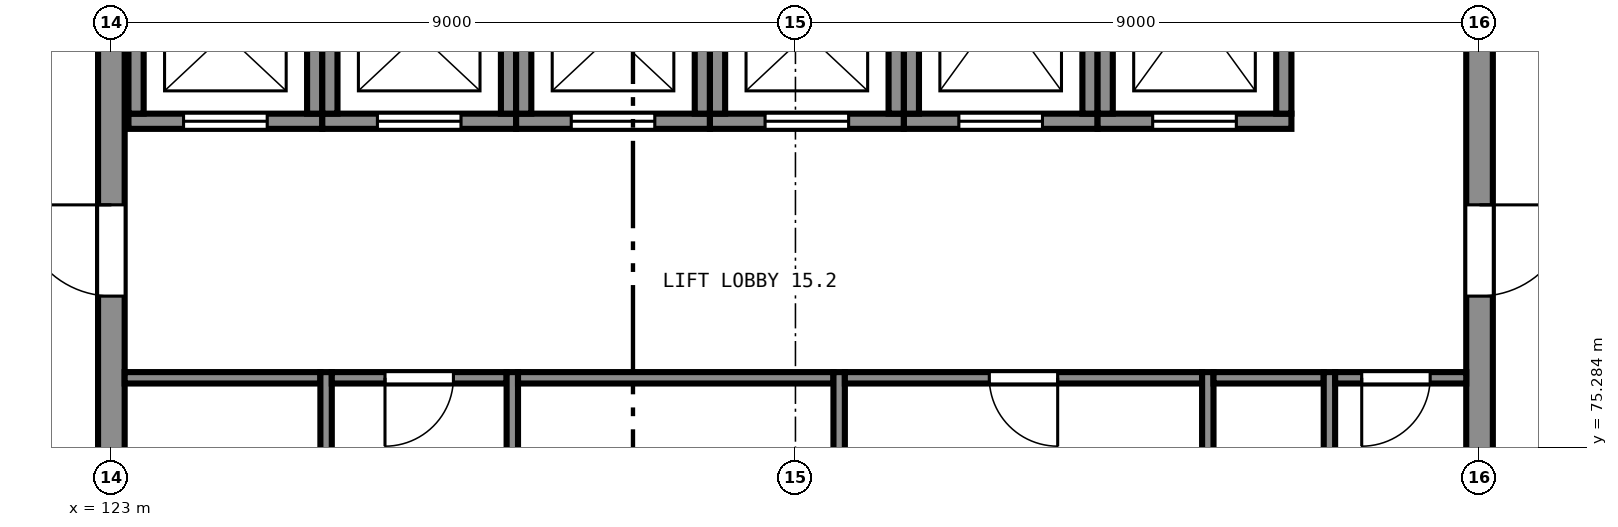
"""IFC4 building model, lengths in metres.
Left out: names, types, materials, properties, quantities, classifications, styles, units other than length and angle.
Written with IfcOpenShell. Run it as: python <this file> out.ifc"""

import sys

from ifc_helpers import new_model, si_unit, direction, frame, frame_2d, origin, place, context, subcontext, project, spatial, rectangle, extrude, element, fill, save


model = new_model("IFC4")
c1 = context("Model", 3, precision=1e-05, world=origin(), true_north=direction((0.0, 1.0)))
c2 = subcontext(c1, "Body", "Model", "MODEL_VIEW")
j1 = project(units=[si_unit("LENGTHUNIT", "METRE"), si_unit("PLANEANGLEUNIT", "RADIAN")], contexts=[c1])
p1 = place(None, origin())
s1 = spatial("IfcSite", under=j1, at=p1, CompositionType="ELEMENT")
p2 = place(p1, origin())
s2 = spatial("IfcBuilding", under=s1, at=p2, CompositionType="ELEMENT")
p3 = place(p2, frame((0.0, 0.0, 61.5)))
s3 = spatial("IfcBuildingStorey", under=s2, at=p3, CompositionType="ELEMENT", Elevation=61.5)
p4 = place(p3, frame((141.0, 65.175, 0.0), z_axis=(0.0, 0.0, 1.0), x_axis=(0.0, 1.0, 0.0)))
e1 = element("IfcWall", 1, at=p4, inside=s3, PredefinedType="SHEAR", context=c2, shape_type="SweptSolid", body=[
    extrude(rectangle(XDim=17.65, YDim=0.35, at=frame_2d((8.825, 0.0))), origin(), (0.0, 0.0, 1.0), 4.0),
])
p5 = place(p4, frame((4.35, 0.0, 0.0)))
e2 = element("IfcOpeningElement", 2, at=p5, cuts=e1, PredefinedType="OPENING", context=c2, shape_type="SweptSolid", body=[
    extrude(rectangle(XDim=1.2, YDim=2.1, at=frame_2d((0.6, 1.05))), frame((0.0, 0.185, 0.0), z_axis=(0.0, -1.0, 0.0), x_axis=(1.0, 0.0, 0.0)), (0.0, 0.0, 1.0), 0.37),
])
p6 = place(p4, frame((12.1, 0.0, 0.0)))
e3 = element("IfcOpeningElement", 3, at=p6, cuts=e1, PredefinedType="OPENING", context=c2, shape_type="SweptSolid", body=[
    extrude(rectangle(XDim=1.2, YDim=2.1, at=frame_2d((0.6, 1.05))), frame((0.0, 0.185, 0.0), z_axis=(0.0, -1.0, 0.0), x_axis=(1.0, 0.0, 0.0)), (0.0, 0.0, 1.0), 0.37),
])
p7 = place(p3, frame((123.0, 82.825, 0.0), z_axis=(0.0, 0.0, 1.0), x_axis=(0.0, -1.0, 0.0)))
e4 = element("IfcWall", 4, at=p7, inside=s3, PredefinedType="SHEAR", context=c2, shape_type="SweptSolid", body=[
    extrude(rectangle(XDim=17.65, YDim=0.35, at=frame_2d((8.825, 0.0))), origin(), (0.0, 0.0, 1.0), 4.0),
])
p8 = place(p7, frame((12.1, 0.0, 0.0)))
e5 = element("IfcOpeningElement", 5, at=p8, cuts=e4, PredefinedType="OPENING", context=c2, shape_type="SweptSolid", body=[
    extrude(rectangle(XDim=1.2, YDim=2.1, at=frame_2d((0.6, 1.05))), frame((0.0, 0.185, 0.0), z_axis=(0.0, -1.0, 0.0), x_axis=(1.0, 0.0, 0.0)), (0.0, 0.0, 1.0), 0.37),
])
p9 = place(p7, frame((4.35, 0.0, 0.0)))
e6 = element("IfcOpeningElement", 6, at=p9, cuts=e4, PredefinedType="OPENING", context=c2, shape_type="SweptSolid", body=[
    extrude(rectangle(XDim=1.2, YDim=2.1, at=frame_2d((0.6, 1.05))), frame((0.0, 0.185, 0.0), z_axis=(0.0, -1.0, 0.0), x_axis=(1.0, 0.0, 0.0)), (0.0, 0.0, 1.0), 0.37),
])
p10 = place(p3, frame((123.225, 79.575, 0.0), z_axis=(0.0, 0.0, 1.0), x_axis=(1.0, 0.0, 0.0)))
e7 = element("IfcWall", 7, at=p10, inside=s3, PredefinedType="SHEAR", context=c2, shape_type="SweptSolid", body=[
    extrude(rectangle(XDim=2.55, YDim=0.2, at=frame_2d((1.275, 0.0))), origin(), (0.0, 0.0, 1.0), 4.0),
])
p11 = place(p10, frame((0.725, 0.0, 0.0)))
e8 = element("IfcOpeningElement", 8, at=p11, cuts=e7, PredefinedType="OPENING", context=c2, shape_type="SweptSolid", body=[
    extrude(rectangle(XDim=1.1, YDim=2.1, at=frame_2d((0.55, 1.05))), frame((0.0, 0.11, 0.0), z_axis=(0.0, -1.0, 0.0), x_axis=(1.0, 0.0, 0.0)), (0.0, 0.0, 1.0), 0.22),
])
for number, where, z_axis, x_axis in (
    (9, (125.675, 79.675, 0.0), (0.0, 0.0, 1.0), (0.0, 1.0, 0.0)),
    (10, (123.325, 81.775, 0.0), (0.0, 0.0, 1.0), (0.0, -1.0, 0.0)),
):
    element("IfcWall", number, at=place(p3, frame(where, z_axis=z_axis, x_axis=x_axis)), inside=s3, PredefinedType="SHEAR", context=c2, shape_type="SweptSolid", body=[
        extrude(rectangle(XDim=2.1, YDim=0.2, at=frame_2d((1.05, 0.0))), origin(), (0.0, 0.0, 1.0), 4.0),
    ])
p12 = place(p3, frame((125.775, 79.575, 0.0), z_axis=(0.0, 0.0, 1.0), x_axis=(1.0, 0.0, 0.0)))
e11 = element("IfcWall", 11, at=p12, inside=s3, PredefinedType="SHEAR", context=c2, shape_type="SweptSolid", body=[
    extrude(rectangle(XDim=2.55, YDim=0.2, at=frame_2d((1.275, 0.0))), origin(), (0.0, 0.0, 1.0), 4.0),
])
p13 = place(p12, frame((0.725, 0.0, 0.0)))
e12 = element("IfcOpeningElement", 12, at=p13, cuts=e11, PredefinedType="OPENING", context=c2, shape_type="SweptSolid", body=[
    extrude(rectangle(XDim=1.1, YDim=2.1, at=frame_2d((0.55, 1.05))), frame((0.0, 0.11, 0.0), z_axis=(0.0, -1.0, 0.0), x_axis=(1.0, 0.0, 0.0)), (0.0, 0.0, 1.0), 0.22),
])
for number, where, z_axis, x_axis in (
    (13, (128.225, 79.675, 0.0), (0.0, 0.0, 1.0), (0.0, 1.0, 0.0)),
    (14, (125.875, 81.775, 0.0), (0.0, 0.0, 1.0), (0.0, -1.0, 0.0)),
):
    element("IfcWall", number, at=place(p3, frame(where, z_axis=z_axis, x_axis=x_axis)), inside=s3, PredefinedType="SHEAR", context=c2, shape_type="SweptSolid", body=[
        extrude(rectangle(XDim=2.1, YDim=0.2, at=frame_2d((1.05, 0.0))), origin(), (0.0, 0.0, 1.0), 4.0),
    ])
p14 = place(p3, frame((128.325, 79.575, 0.0), z_axis=(0.0, 0.0, 1.0), x_axis=(1.0, 0.0, 0.0)))
e15 = element("IfcWall", 15, at=p14, inside=s3, PredefinedType="SHEAR", context=c2, shape_type="SweptSolid", body=[
    extrude(rectangle(XDim=2.55, YDim=0.2, at=frame_2d((1.275, 0.0))), origin(), (0.0, 0.0, 1.0), 4.0),
])
p15 = place(p14, frame((0.725, 0.0, 0.0)))
e16 = element("IfcOpeningElement", 16, at=p15, cuts=e15, PredefinedType="OPENING", context=c2, shape_type="SweptSolid", body=[
    extrude(rectangle(XDim=1.1, YDim=2.1, at=frame_2d((0.55, 1.05))), frame((0.0, 0.11, 0.0), z_axis=(0.0, -1.0, 0.0), x_axis=(1.0, 0.0, 0.0)), (0.0, 0.0, 1.0), 0.22),
])
for number, where, z_axis, x_axis in (
    (17, (130.775, 79.675, 0.0), (0.0, 0.0, 1.0), (0.0, 1.0, 0.0)),
    (18, (128.425, 81.775, 0.0), (0.0, 0.0, 1.0), (0.0, -1.0, 0.0)),
):
    element("IfcWall", number, at=place(p3, frame(where, z_axis=z_axis, x_axis=x_axis)), inside=s3, PredefinedType="SHEAR", context=c2, shape_type="SweptSolid", body=[
        extrude(rectangle(XDim=2.1, YDim=0.2, at=frame_2d((1.05, 0.0))), origin(), (0.0, 0.0, 1.0), 4.0),
    ])
p16 = place(p3, frame((130.875, 79.575, 0.0), z_axis=(0.0, 0.0, 1.0), x_axis=(1.0, 0.0, 0.0)))
e19 = element("IfcWall", 19, at=p16, inside=s3, PredefinedType="SHEAR", context=c2, shape_type="SweptSolid", body=[
    extrude(rectangle(XDim=2.55, YDim=0.2, at=frame_2d((1.275, 0.0))), origin(), (0.0, 0.0, 1.0), 4.0),
])
p17 = place(p16, frame((0.725, 0.0, 0.0)))
e20 = element("IfcOpeningElement", 20, at=p17, cuts=e19, PredefinedType="OPENING", context=c2, shape_type="SweptSolid", body=[
    extrude(rectangle(XDim=1.1, YDim=2.1, at=frame_2d((0.55, 1.05))), frame((0.0, 0.11, 0.0), z_axis=(0.0, -1.0, 0.0), x_axis=(1.0, 0.0, 0.0)), (0.0, 0.0, 1.0), 0.22),
])
for number, where, z_axis, x_axis in (
    (21, (133.325, 79.675, 0.0), (0.0, 0.0, 1.0), (0.0, 1.0, 0.0)),
    (22, (130.975, 81.775, 0.0), (0.0, 0.0, 1.0), (0.0, -1.0, 0.0)),
):
    element("IfcWall", number, at=place(p3, frame(where, z_axis=z_axis, x_axis=x_axis)), inside=s3, PredefinedType="SHEAR", context=c2, shape_type="SweptSolid", body=[
        extrude(rectangle(XDim=2.1, YDim=0.2, at=frame_2d((1.05, 0.0))), origin(), (0.0, 0.0, 1.0), 4.0),
    ])
p18 = place(p3, frame((133.425, 79.575, 0.0), z_axis=(0.0, 0.0, 1.0), x_axis=(1.0, 0.0, 0.0)))
e23 = element("IfcWall", 23, at=p18, inside=s3, PredefinedType="SHEAR", context=c2, shape_type="SweptSolid", body=[
    extrude(rectangle(XDim=2.55, YDim=0.2, at=frame_2d((1.275, 0.0))), origin(), (0.0, 0.0, 1.0), 4.0),
])
p19 = place(p18, frame((0.725, 0.0, 0.0)))
e24 = element("IfcOpeningElement", 24, at=p19, cuts=e23, PredefinedType="OPENING", context=c2, shape_type="SweptSolid", body=[
    extrude(rectangle(XDim=1.1, YDim=2.1, at=frame_2d((0.55, 1.05))), frame((0.0, 0.11, 0.0), z_axis=(0.0, -1.0, 0.0), x_axis=(1.0, 0.0, 0.0)), (0.0, 0.0, 1.0), 0.22),
])
for number, where, z_axis, x_axis in (
    (25, (135.875, 79.675, 0.0), (0.0, 0.0, 1.0), (0.0, 1.0, 0.0)),
    (26, (133.525, 82.475, 0.0), (0.0, 0.0, 1.0), (0.0, -1.0, 0.0)),
):
    element("IfcWall", number, at=place(p3, frame(where, z_axis=z_axis, x_axis=x_axis)), inside=s3, PredefinedType="SHEAR", context=c2, shape_type="SweptSolid", body=[
        extrude(rectangle(XDim=2.8, YDim=0.2, at=frame_2d((1.4, 0.0))), origin(), (0.0, 0.0, 1.0), 4.0),
    ])
p20 = place(p3, frame((135.975, 79.575, 0.0), z_axis=(0.0, 0.0, 1.0), x_axis=(1.0, 0.0, 0.0)))
e27 = element("IfcWall", 27, at=p20, inside=s3, PredefinedType="SHEAR", context=c2, shape_type="SweptSolid", body=[
    extrude(rectangle(XDim=2.55, YDim=0.2, at=frame_2d((1.275, 0.0))), origin(), (0.0, 0.0, 1.0), 4.0),
])
p21 = place(p20, frame((0.725, 0.0, 0.0)))
e28 = element("IfcOpeningElement", 28, at=p21, cuts=e27, PredefinedType="OPENING", context=c2, shape_type="SweptSolid", body=[
    extrude(rectangle(XDim=1.1, YDim=2.1, at=frame_2d((0.55, 1.05))), frame((0.0, 0.11, 0.0), z_axis=(0.0, -1.0, 0.0), x_axis=(1.0, 0.0, 0.0)), (0.0, 0.0, 1.0), 0.22),
])
for number, where, z_axis, x_axis in (
    (29, (138.425, 79.675, 0.0), (0.0, 0.0, 1.0), (0.0, 1.0, 0.0)),
    (30, (136.075, 82.475, 0.0), (0.0, 0.0, 1.0), (0.0, -1.0, 0.0)),
):
    element("IfcWall", number, at=place(p3, frame(where, z_axis=z_axis, x_axis=x_axis)), inside=s3, PredefinedType="SHEAR", context=c2, shape_type="SweptSolid", body=[
        extrude(rectangle(XDim=2.8, YDim=0.2, at=frame_2d((1.4, 0.0))), origin(), (0.0, 0.0, 1.0), 4.0),
    ])
p22 = place(p3, frame((125.825, 71.725, 0.0), z_axis=(0.0, 0.0, 1.0), x_axis=(0.0, 1.0, 0.0)))
e31 = element("IfcWall", 31, at=p22, inside=s3, PredefinedType="PARTITIONING", context=c2, shape_type="SweptSolid", body=[
    extrude(rectangle(XDim=4.55, YDim=0.15, at=frame_2d((2.275, 0.0))), origin(), (0.0, 0.0, 1.0), 3.58),
])
p23 = place(p3, frame((123.175, 76.2, 0.0), z_axis=(0.0, 0.0, 1.0), x_axis=(1.0, 0.0, 0.0)))
e32 = element("IfcWall", 32, at=p23, inside=s3, PredefinedType="PARTITIONING", context=c2, shape_type="SweptSolid", body=[
    extrude(rectangle(XDim=2.575, YDim=0.15, at=frame_2d((1.288, 0.0))), origin(), (0.0, 0.0, 1.0), 3.58),
])
p24 = place(p3, frame((128.275, 71.725, 0.0), z_axis=(0.0, 0.0, 1.0), x_axis=(0.0, 1.0, 0.0)))
e33 = element("IfcWall", 33, at=p24, inside=s3, PredefinedType="PARTITIONING", context=c2, shape_type="SweptSolid", body=[
    extrude(rectangle(XDim=4.55, YDim=0.15, at=frame_2d((2.275, 0.0))), origin(), (0.0, 0.0, 1.0), 3.58),
])
p25 = place(p3, frame((125.9, 76.2, 0.0), z_axis=(0.0, 0.0, 1.0), x_axis=(1.0, 0.0, 0.0)))
e34 = element("IfcWall", 34, at=p25, inside=s3, PredefinedType="PARTITIONING", context=c2, shape_type="SweptSolid", body=[
    extrude(rectangle(XDim=2.3, YDim=0.15, at=frame_2d((1.15, 0.0))), origin(), (0.0, 0.0, 1.0), 3.58),
])
p26 = place(p25, frame((0.7, 0.0, 0.0)))
e35 = element("IfcOpeningElement", 35, at=p26, cuts=e34, PredefinedType="OPENING", context=c2, shape_type="SweptSolid", body=[
    extrude(rectangle(XDim=0.9, YDim=2.1, at=frame_2d((0.45, 1.05))), frame((0.0, 0.085, 0.0), z_axis=(0.0, -1.0, 0.0), x_axis=(1.0, 0.0, 0.0)), (0.0, 0.0, 1.0), 0.17),
])
p27 = place(p3, frame((132.575, 71.725, 0.0), z_axis=(0.0, 0.0, 1.0), x_axis=(0.0, 1.0, 0.0)))
e36 = element("IfcWall", 36, at=p27, inside=s3, PredefinedType="PARTITIONING", context=c2, shape_type="SweptSolid", body=[
    extrude(rectangle(XDim=4.55, YDim=0.15, at=frame_2d((2.275, 0.0))), origin(), (0.0, 0.0, 1.0), 3.58),
])
p28 = place(p3, frame((128.35, 76.2, 0.0), z_axis=(0.0, 0.0, 1.0), x_axis=(1.0, 0.0, 0.0)))
e37 = element("IfcWall", 37, at=p28, inside=s3, PredefinedType="PARTITIONING", context=c2, shape_type="SweptSolid", body=[
    extrude(rectangle(XDim=4.15, YDim=0.15, at=frame_2d((2.075, 0.0))), origin(), (0.0, 0.0, 1.0), 3.58),
])
p29 = place(p3, frame((137.425, 71.725, 0.0), z_axis=(0.0, 0.0, 1.0), x_axis=(0.0, 1.0, 0.0)))
e38 = element("IfcWall", 38, at=p29, inside=s3, PredefinedType="PARTITIONING", context=c2, shape_type="SweptSolid", body=[
    extrude(rectangle(XDim=4.55, YDim=0.15, at=frame_2d((2.275, 0.0))), origin(), (0.0, 0.0, 1.0), 3.58),
])
p30 = place(p3, frame((132.65, 76.2, 0.0), z_axis=(0.0, 0.0, 1.0), x_axis=(1.0, 0.0, 0.0)))
e39 = element("IfcWall", 39, at=p30, inside=s3, PredefinedType="PARTITIONING", context=c2, shape_type="SweptSolid", body=[
    extrude(rectangle(XDim=4.7, YDim=0.15, at=frame_2d((2.35, 0.0))), origin(), (0.0, 0.0, 1.0), 3.58),
])
p31 = place(p30, frame((1.9, 0.0, 0.0)))
e40 = element("IfcOpeningElement", 40, at=p31, cuts=e39, PredefinedType="OPENING", context=c2, shape_type="SweptSolid", body=[
    extrude(rectangle(XDim=0.9, YDim=2.1, at=frame_2d((0.45, 1.05))), frame((0.0, 0.085, 0.0), z_axis=(0.0, -1.0, 0.0), x_axis=(1.0, 0.0, 0.0)), (0.0, 0.0, 1.0), 0.17),
])
p32 = place(p3, frame((139.025, 71.725, 0.0), z_axis=(0.0, 0.0, 1.0), x_axis=(0.0, 1.0, 0.0)))
e41 = element("IfcWall", 41, at=p32, inside=s3, PredefinedType="PARTITIONING", context=c2, shape_type="SweptSolid", body=[
    extrude(rectangle(XDim=4.55, YDim=0.15, at=frame_2d((2.275, 0.0))), origin(), (0.0, 0.0, 1.0), 3.58),
])
p33 = place(p3, frame((137.5, 76.2, 0.0), z_axis=(0.0, 0.0, 1.0), x_axis=(1.0, 0.0, 0.0)))
e42 = element("IfcWall", 42, at=p33, inside=s3, PredefinedType="PARTITIONING", context=c2, shape_type="SweptSolid", body=[
    extrude(rectangle(XDim=1.45, YDim=0.15, at=frame_2d((0.725, 0.0))), origin(), (0.0, 0.0, 1.0), 3.58),
])
p34 = place(p3, frame((139.1, 76.2, 0.0), z_axis=(0.0, 0.0, 1.0), x_axis=(1.0, 0.0, 0.0)))
e43 = element("IfcWall", 43, at=p34, inside=s3, PredefinedType="PARTITIONING", context=c2, shape_type="SweptSolid", body=[
    extrude(rectangle(XDim=1.725, YDim=0.15, at=frame_2d((0.862, 0.0))), origin(), (0.0, 0.0, 1.0), 3.58),
])
p35 = place(p34, frame((0.35, 0.0, 0.0)))
e44 = element("IfcOpeningElement", 44, at=p35, cuts=e43, PredefinedType="OPENING", context=c2, shape_type="SweptSolid", body=[
    extrude(rectangle(XDim=0.9, YDim=2.1, at=frame_2d((0.45, 1.05))), frame((0.0, 0.085, 0.0), z_axis=(0.0, -1.0, 0.0), x_axis=(1.0, 0.0, 0.0)), (0.0, 0.0, 1.0), 0.17),
])
p36 = place(p11, origin())
e45 = element("IfcDoor", 45, at=p36, inside=s3, OperationType="SLIDING_TO_LEFT", PredefinedType="DOOR", context=c2, shape_type="SweptSolid", body=[
    extrude(rectangle(XDim=1.1, YDim=2.1, at=frame_2d((0.55, 1.05))), frame((0.0, 0.025, 0.0), z_axis=(0.0, -1.0, 0.0), x_axis=(1.0, 0.0, 0.0)), (0.0, 0.0, 1.0), 0.05),
])
fill(e8, e45)
p37 = place(p13, origin())
e46 = element("IfcDoor", 46, at=p37, inside=s3, OperationType="SLIDING_TO_LEFT", PredefinedType="DOOR", context=c2, shape_type="SweptSolid", body=[
    extrude(rectangle(XDim=1.1, YDim=2.1, at=frame_2d((0.55, 1.05))), frame((0.0, 0.025, 0.0), z_axis=(0.0, -1.0, 0.0), x_axis=(1.0, 0.0, 0.0)), (0.0, 0.0, 1.0), 0.05),
])
fill(e12, e46)
p38 = place(p15, origin())
e47 = element("IfcDoor", 47, at=p38, inside=s3, OperationType="SLIDING_TO_LEFT", PredefinedType="DOOR", context=c2, shape_type="SweptSolid", body=[
    extrude(rectangle(XDim=1.1, YDim=2.1, at=frame_2d((0.55, 1.05))), frame((0.0, 0.025, 0.0), z_axis=(0.0, -1.0, 0.0), x_axis=(1.0, 0.0, 0.0)), (0.0, 0.0, 1.0), 0.05),
])
fill(e16, e47)
p39 = place(p17, origin())
e48 = element("IfcDoor", 48, at=p39, inside=s3, OperationType="SLIDING_TO_LEFT", PredefinedType="DOOR", context=c2, shape_type="SweptSolid", body=[
    extrude(rectangle(XDim=1.1, YDim=2.1, at=frame_2d((0.55, 1.05))), frame((0.0, 0.025, 0.0), z_axis=(0.0, -1.0, 0.0), x_axis=(1.0, 0.0, 0.0)), (0.0, 0.0, 1.0), 0.05),
])
fill(e20, e48)
p40 = place(p19, origin())
e49 = element("IfcDoor", 49, at=p40, inside=s3, OperationType="SLIDING_TO_LEFT", PredefinedType="DOOR", context=c2, shape_type="SweptSolid", body=[
    extrude(rectangle(XDim=1.1, YDim=2.1, at=frame_2d((0.55, 1.05))), frame((0.0, 0.025, 0.0), z_axis=(0.0, -1.0, 0.0), x_axis=(1.0, 0.0, 0.0)), (0.0, 0.0, 1.0), 0.05),
])
fill(e24, e49)
p41 = place(p21, origin())
e50 = element("IfcDoor", 50, at=p41, inside=s3, OperationType="SLIDING_TO_LEFT", PredefinedType="DOOR", context=c2, shape_type="SweptSolid", body=[
    extrude(rectangle(XDim=1.1, YDim=2.1, at=frame_2d((0.55, 1.05))), frame((0.0, 0.025, 0.0), z_axis=(0.0, -1.0, 0.0), x_axis=(1.0, 0.0, 0.0)), (0.0, 0.0, 1.0), 0.05),
])
fill(e28, e50)
p42 = place(p9, frame((1.2, 0.0, 0.0), z_axis=(0.0, 0.0, 1.0), x_axis=(-1.0, 0.0, 0.0)))
e51 = element("IfcDoor", 51, at=p42, inside=s3, OperationType="SINGLE_SWING_LEFT", PredefinedType="DOOR", context=c2, shape_type="SweptSolid", body=[
    extrude(rectangle(XDim=1.2, YDim=2.1, at=frame_2d((0.6, 1.05))), frame((0.0, 0.025, 0.0), z_axis=(0.0, -1.0, 0.0), x_axis=(1.0, 0.0, 0.0)), (0.0, 0.0, 1.0), 0.05),
])
fill(e6, e51)
p43 = place(p6, frame((1.2, 0.0, 0.0), z_axis=(0.0, 0.0, 1.0), x_axis=(-1.0, 0.0, 0.0)))
e52 = element("IfcDoor", 52, at=p43, inside=s3, OperationType="SINGLE_SWING_RIGHT", PredefinedType="DOOR", context=c2, shape_type="SweptSolid", body=[
    extrude(rectangle(XDim=1.2, YDim=2.1, at=frame_2d((0.6, 1.05))), frame((0.0, 0.025, 0.0), z_axis=(0.0, -1.0, 0.0), x_axis=(1.0, 0.0, 0.0)), (0.0, 0.0, 1.0), 0.05),
])
fill(e3, e52)
p44 = place(p26, frame((0.9, 0.0, 0.0), z_axis=(0.0, 0.0, 1.0), x_axis=(-1.0, 0.0, 0.0)))
e53 = element("IfcDoor", 53, at=p44, inside=s3, OperationType="SINGLE_SWING_LEFT", PredefinedType="DOOR", context=c2, shape_type="SweptSolid", body=[
    extrude(rectangle(XDim=0.9, YDim=2.1, at=frame_2d((0.45, 1.05))), frame((0.0, 0.025, 0.0), z_axis=(0.0, -1.0, 0.0), x_axis=(1.0, 0.0, 0.0)), (0.0, 0.0, 1.0), 0.05),
])
fill(e35, e53)
p45 = place(p31, frame((0.9, 0.0, 0.0), z_axis=(0.0, 0.0, 1.0), x_axis=(-1.0, 0.0, 0.0)))
e54 = element("IfcDoor", 54, at=p45, inside=s3, OperationType="SINGLE_SWING_RIGHT", PredefinedType="DOOR", context=c2, shape_type="SweptSolid", body=[
    extrude(rectangle(XDim=0.9, YDim=2.1, at=frame_2d((0.45, 1.05))), frame((0.0, 0.025, 0.0), z_axis=(0.0, -1.0, 0.0), x_axis=(1.0, 0.0, 0.0)), (0.0, 0.0, 1.0), 0.05),
])
fill(e40, e54)
p46 = place(p35, frame((0.9, 0.0, 0.0), z_axis=(0.0, 0.0, 1.0), x_axis=(-1.0, 0.0, 0.0)))
e55 = element("IfcDoor", 55, at=p46, inside=s3, OperationType="SINGLE_SWING_LEFT", PredefinedType="DOOR", context=c2, shape_type="SweptSolid", body=[
    extrude(rectangle(XDim=0.9, YDim=2.1, at=frame_2d((0.45, 1.05))), frame((0.0, 0.025, 0.0), z_axis=(0.0, -1.0, 0.0), x_axis=(1.0, 0.0, 0.0)), (0.0, 0.0, 1.0), 0.05),
])
fill(e44, e55)
save(model, sys.argv[1])
